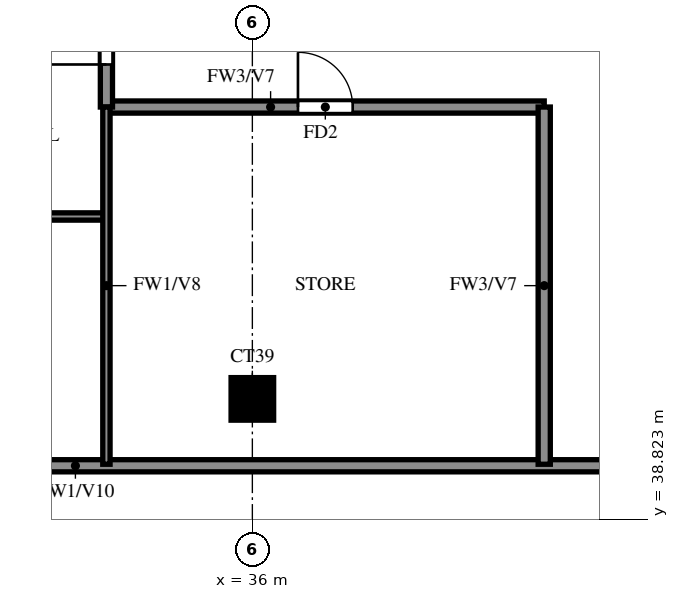
"""IFC4 building model, lengths in metres.
Left out: names, types, materials, properties, quantities, classifications, styles, units other than length and angle.
Written with IfcOpenShell. Run it as: python <this file> out.ifc"""

import sys

from ifc_helpers import new_model, si_unit, direction, frame, frame_2d, origin, origin_2d, place, context, subcontext, project, spatial, rectangle, extrude, source, transform, mapped, element, fill, save


model = new_model("IFC4")
c1 = context("Model", 3, precision=1e-05, world=origin(), true_north=direction((0.0, 1.0)))
c2 = subcontext(c1, "Body", "Model", "MODEL_VIEW")
j1 = project(units=[si_unit("LENGTHUNIT", "METRE"), si_unit("PLANEANGLEUNIT", "RADIAN")], contexts=[c1])
p1 = place(None, origin())
s1 = spatial("IfcSite", under=j1, at=p1, CompositionType="ELEMENT")
p2 = place(p1, origin())
s2 = spatial("IfcBuilding", under=s1, at=p2, CompositionType="ELEMENT")
p3 = place(p2, frame((0.0, 0.0, 267.5)))
s3 = spatial("IfcBuildingStorey", under=s2, at=p3, CompositionType="ELEMENT", Elevation=267.5)
m1 = source(origin(), c2, "Body", "SweptSolid", [
    extrude(rectangle(XDim=0.7, YDim=0.7, at=origin_2d()), origin(), (0.0, 0.0, 1.0), 3.099),
])
p4 = place(p3, frame((36.0, 40.8, 0.0), z_axis=(0.0, 0.0, 1.0), x_axis=(1.0, 0.0, 0.0)))
e1 = element("IfcColumn", 1, at=p4, inside=s3, PredefinedType="COLUMN", context=c2, shape_type="MappedRepresentation", body=[
    mapped(m1, transform((0.0, 0.0, 0.0))),
])
p5 = place(p3, frame((22.2, 39.7, 0.0), z_axis=(0.0, 0.0, 1.0), x_axis=(1.0, 0.0, 0.0)))
e2 = element("IfcWall", 2, at=p5, inside=s3, PredefinedType="SOLIDWALL", context=c2, shape_type="SweptSolid", body=[
    extrude(rectangle(XDim=19.8, YDim=0.2, at=frame_2d((9.9, 0.0))), origin(), (0.0, 0.0, 1.0), 3.099),
])
p6 = place(p5, frame((0.7, 0.0, 0.6)))
e3 = element("IfcOpeningElement", 3, at=p6, cuts=e2, PredefinedType="OPENING", context=c2, shape_type="SweptSolid", body=[
    extrude(rectangle(XDim=1.8, YDim=2.4, at=frame_2d((0.9, 1.2))), frame((0.0, 0.11, 0.0), z_axis=(0.0, -1.0, 0.0), x_axis=(1.0, 0.0, 0.0)), (0.0, 0.0, 1.0), 0.22),
])
p7 = place(p5, frame((4.35, 0.0, 1.5)))
e4 = element("IfcOpeningElement", 4, at=p7, cuts=e2, PredefinedType="OPENING", context=c2, shape_type="SweptSolid", body=[
    extrude(rectangle(XDim=0.9, YDim=0.9, at=frame_2d((0.45, 0.45))), frame((0.0, 0.11, 0.0), z_axis=(0.0, -1.0, 0.0), x_axis=(1.0, 0.0, 0.0)), (0.0, 0.0, 1.0), 0.22),
])
p8 = place(p5, frame((7.8, 0.0, 0.6)))
e5 = element("IfcOpeningElement", 5, at=p8, cuts=e2, PredefinedType="OPENING", context=c2, shape_type="SweptSolid", body=[
    extrude(rectangle(XDim=2.4, YDim=2.4, at=frame_2d((1.2, 1.2))), frame((0.0, 0.11, 0.0), z_axis=(0.0, -1.0, 0.0), x_axis=(1.0, 0.0, 0.0)), (0.0, 0.0, 1.0), 0.22),
])
p9 = place(p3, frame((33.6, 45.6, 0.0), z_axis=(0.0, 0.0, 1.0), x_axis=(1.0, 0.0, 0.0)))
e6 = element("IfcWall", 6, at=p9, inside=s3, PredefinedType="SOLIDWALL", context=c2, shape_type="SweptSolid", body=[
    extrude(rectangle(XDim=7.2, YDim=0.2, at=frame_2d((3.6, 0.0))), origin(), (0.0, 0.0, 1.0), 3.099),
])
p10 = place(p9, frame((3.15, 0.0, 0.0)))
e7 = element("IfcOpeningElement", 7, at=p10, cuts=e6, PredefinedType="OPENING", context=c2, shape_type="SweptSolid", body=[
    extrude(rectangle(XDim=0.9, YDim=2.1, at=frame_2d((0.45, 1.05))), frame((0.0, 0.11, 0.0), z_axis=(0.0, -1.0, 0.0), x_axis=(1.0, 0.0, 0.0)), (0.0, 0.0, 1.0), 0.22),
])
p11 = place(p3, frame((33.6, 45.6, 0.0), z_axis=(0.0, 0.0, 1.0), x_axis=(0.0, 1.0, 0.0)))
e8 = element("IfcWall", 8, at=p11, inside=s3, PredefinedType="SOLIDWALL", context=c2, shape_type="SweptSolid", body=[
    extrude(rectangle(XDim=16.8, YDim=0.2, at=frame_2d((8.4, 0.0))), origin(), (0.0, 0.0, 1.0), 3.099),
])
p12 = place(p11, frame((0.7, 0.0, 0.0)))
e9 = element("IfcOpeningElement", 9, at=p12, cuts=e8, PredefinedType="OPENING", context=c2, shape_type="SweptSolid", body=[
    extrude(rectangle(XDim=1.0, YDim=2.1, at=frame_2d((0.5, 1.05))), frame((0.0, 0.11, 0.0), z_axis=(0.0, -1.0, 0.0), x_axis=(1.0, 0.0, 0.0)), (0.0, 0.0, 1.0), 0.22),
])
p13 = place(p11, frame((8.3, 0.0, 0.0)))
e10 = element("IfcOpeningElement", 10, at=p13, cuts=e8, PredefinedType="OPENING", context=c2, shape_type="SweptSolid", body=[
    extrude(rectangle(XDim=1.0, YDim=2.1, at=frame_2d((0.5, 1.05))), frame((0.0, 0.11, 0.0), z_axis=(0.0, -1.0, 0.0), x_axis=(1.0, 0.0, 0.0)), (0.0, 0.0, 1.0), 0.22),
])
p14 = place(p11, frame((15.1, 0.0, 0.0)))
e11 = element("IfcOpeningElement", 11, at=p14, cuts=e8, PredefinedType="OPENING", context=c2, shape_type="SweptSolid", body=[
    extrude(rectangle(XDim=1.0, YDim=2.1, at=frame_2d((0.5, 1.05))), frame((0.0, 0.11, 0.0), z_axis=(0.0, -1.0, 0.0), x_axis=(1.0, 0.0, 0.0)), (0.0, 0.0, 1.0), 0.22),
])
p15 = place(p3, frame((40.8, 39.725, 0.0), z_axis=(0.0, 0.0, 1.0), x_axis=(0.0, 1.0, 0.0)))
e12 = element("IfcWall", 12, at=p15, inside=s3, PredefinedType="SOLIDWALL", context=c2, shape_type="SweptSolid", body=[
    extrude(rectangle(XDim=5.875, YDim=0.2, at=frame_2d((2.938, 0.0))), origin(), (0.0, 0.0, 1.0), 3.099),
])
p16 = place(p3, frame((25.2, 43.8, 0.0), z_axis=(0.0, 0.0, 1.0), x_axis=(1.0, 0.0, 0.0)))
e13 = element("IfcWall", 13, at=p16, inside=s3, PredefinedType="PARTITIONING", context=c2, shape_type="SweptSolid", body=[
    extrude(rectangle(XDim=8.4, YDim=0.12, at=frame_2d((4.2, 0.0))), origin(), (0.0, 0.0, 1.0), 3.099),
])
p17 = place(p16, frame((1.35, 0.0, 0.0)))
e14 = element("IfcOpeningElement", 14, at=p17, cuts=e13, PredefinedType="OPENING", context=c2, shape_type="SweptSolid", body=[
    extrude(rectangle(XDim=0.9, YDim=2.1, at=frame_2d((0.45, 1.05))), frame((0.0, 0.07, 0.0), z_axis=(0.0, -1.0, 0.0), x_axis=(1.0, 0.0, 0.0)), (0.0, 0.0, 1.0), 0.14),
])
p18 = place(p16, frame((5.55, 0.0, 0.0)))
e15 = element("IfcOpeningElement", 15, at=p18, cuts=e13, PredefinedType="OPENING", context=c2, shape_type="SweptSolid", body=[
    extrude(rectangle(XDim=0.9, YDim=2.1, at=frame_2d((0.45, 1.05))), frame((0.0, 0.07, 0.0), z_axis=(0.0, -1.0, 0.0), x_axis=(1.0, 0.0, 0.0)), (0.0, 0.0, 1.0), 0.14),
])
p19 = place(p3, frame((33.6, 39.725, 0.0), z_axis=(0.0, 0.0, 1.0), x_axis=(0.0, 1.0, 0.0)))
e16 = element("IfcWall", 16, at=p19, inside=s3, PredefinedType="PARTITIONING", context=c2, shape_type="SweptSolid", body=[
    extrude(rectangle(XDim=5.875, YDim=0.12, at=frame_2d((2.938, 0.0))), origin(), (0.0, 0.0, 1.0), 3.099),
])
p20 = place(p12, origin())
e17 = element("IfcDoor", 17, at=p20, inside=s3, OperationType="SINGLE_SWING_RIGHT", PredefinedType="DOOR", context=c2, shape_type="SweptSolid", body=[
    extrude(rectangle(XDim=1.0, YDim=2.1, at=frame_2d((0.5, 1.05))), frame((0.0, 0.025, 0.0), z_axis=(0.0, -1.0, 0.0), x_axis=(1.0, 0.0, 0.0)), (0.0, 0.0, 1.0), 0.05),
])
fill(e9, e17)
p21 = place(p10, origin())
e18 = element("IfcDoor", 18, at=p21, inside=s3, OperationType="SINGLE_SWING_LEFT", PredefinedType="DOOR", context=c2, shape_type="SweptSolid", body=[
    extrude(rectangle(XDim=0.9, YDim=2.1, at=frame_2d((0.45, 1.05))), frame((0.0, 0.025, 0.0), z_axis=(0.0, -1.0, 0.0), x_axis=(1.0, 0.0, 0.0)), (0.0, 0.0, 1.0), 0.05),
])
fill(e7, e18)
save(model, sys.argv[1])
